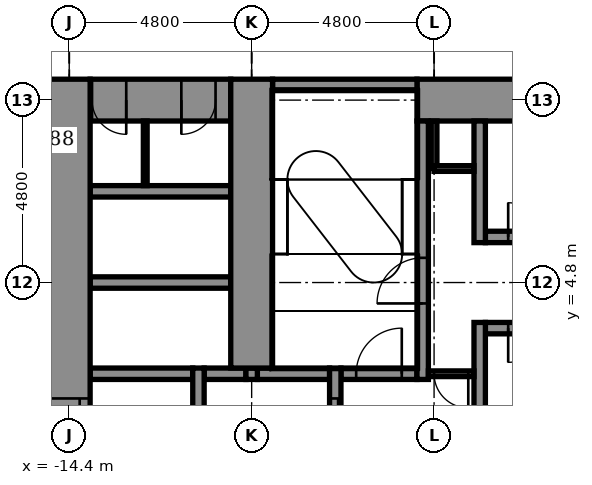
"""IFC4 building model, lengths in metres.
Left out: names, types, materials, properties, quantities, classifications, styles, units other than length and angle.
Written with IfcOpenShell. Run it as: python <this file> out.ifc"""

import sys

from ifc_helpers import new_model, si_unit, direction, frame, frame_2d, origin, place, context, subcontext, project, spatial, rectangle, extrude, element, fill, save


model = new_model("IFC4")
c1 = context("Model", 3, precision=1e-05, world=origin(), true_north=direction((0.0, 1.0)))
c2 = subcontext(c1, "Body", "Model", "MODEL_VIEW")
j1 = project(units=[si_unit("LENGTHUNIT", "METRE"), si_unit("PLANEANGLEUNIT", "RADIAN")], contexts=[c1])
p1 = place(None, origin())
s1 = spatial("IfcSite", under=j1, at=p1, CompositionType="ELEMENT")
p2 = place(p1, origin())
s2 = spatial("IfcBuilding", under=s1, at=p2, CompositionType="ELEMENT")
p3 = place(p2, frame((0.0, 0.0, 22.4)))
s3 = spatial("IfcBuildingStorey", under=s2, at=p3, CompositionType="ELEMENT", Elevation=22.4)
p4 = place(p3, frame((-13.85, 2.4, -0.25), z_axis=(0.0, 0.0, 1.0), x_axis=(1.0, 0.0, 0.0)))
e1 = element("IfcWall", 1, at=p4, inside=s3, PredefinedType="STANDARD", context=c2, shape_type="SweptSolid", body=[
    extrude(rectangle(XDim=2.7, YDim=0.3, at=frame_2d((1.35, 0.0))), origin(), (0.0, 0.0, 1.0), 5.5),
])
p5 = place(p3, frame((-10.85, 2.4, -0.25), z_axis=(0.0, 0.0, 1.0), x_axis=(1.0, 0.0, 0.0)))
e2 = element("IfcWall", 2, at=p5, inside=s3, PredefinedType="STANDARD", context=c2, shape_type="SweptSolid", body=[
    extrude(rectangle(XDim=1.1, YDim=0.3, at=frame_2d((0.55, 0.0))), origin(), (0.0, 0.0, 1.0), 5.5),
])
p6 = place(p3, frame((-9.45, 2.4, -0.25), z_axis=(0.0, 0.0, 1.0), x_axis=(1.0, 0.0, 0.0)))
e3 = element("IfcWall", 3, at=p6, inside=s3, PredefinedType="STANDARD", context=c2, shape_type="SweptSolid", body=[
    extrude(rectangle(XDim=1.9, YDim=0.3, at=frame_2d((0.95, 0.0))), origin(), (0.0, 0.0, 1.0), 5.5),
])
p7 = place(p3, frame((-7.25, 2.4, -0.25), z_axis=(0.0, 0.0, 1.0), x_axis=(1.0, 0.0, 0.0)))
e4 = element("IfcWall", 4, at=p7, inside=s3, PredefinedType="STANDARD", context=c2, shape_type="SweptSolid", body=[
    extrude(rectangle(XDim=2.0, YDim=0.3, at=frame_2d((1.0, 0.0))), origin(), (0.0, 0.0, 1.0), 5.5),
])
p8 = place(p7, frame((0.4, 0.0, 0.25)))
e5 = element("IfcOpeningElement", 5, at=p8, cuts=e4, PredefinedType="OPENING", context=c2, shape_type="SweptSolid", body=[
    extrude(rectangle(XDim=1.2, YDim=2.1, at=frame_2d((0.6, 1.05))), frame((0.0, 0.16, 0.0), z_axis=(0.0, -1.0, 0.0), x_axis=(1.0, 0.0, 0.0)), (0.0, 0.0, 1.0), 0.32),
])
p9 = place(p3, frame((-3.45, 3.6, -0.25), z_axis=(0.0, 0.0, 1.0), x_axis=(1.0, 0.0, 0.0)))
e6 = element("IfcWall", 6, at=p9, inside=s3, PredefinedType="STANDARD", context=c2, shape_type="SweptSolid", body=[
    extrude(rectangle(XDim=2.1, YDim=0.3, at=frame_2d((1.05, 0.0))), origin(), (0.0, 0.0, 1.0), 5.5),
])
p10 = place(p9, frame((0.6, 0.0, 0.25)))
e7 = element("IfcOpeningElement", 7, at=p10, cuts=e6, PredefinedType="OPENING", context=c2, shape_type="SweptSolid", body=[
    extrude(rectangle(XDim=0.9, YDim=2.1, at=frame_2d((0.45, 1.05))), frame((0.0, 0.16, 0.0), z_axis=(0.0, -1.0, 0.0), x_axis=(1.0, 0.0, 0.0)), (0.0, 0.0, 1.0), 0.32),
])
p11 = place(p3, frame((-13.85, 4.8, -0.25), z_axis=(0.0, 0.0, 1.0), x_axis=(1.0, 0.0, 0.0)))
e8 = element("IfcWall", 8, at=p11, inside=s3, PredefinedType="STANDARD", context=c2, shape_type="SweptSolid", body=[
    extrude(rectangle(XDim=3.7, YDim=0.3, at=frame_2d((1.85, 0.0))), origin(), (0.0, 0.0, 1.0), 5.5),
])
p12 = place(p3, frame((-3.45, 6.0, -0.25), z_axis=(0.0, 0.0, 1.0), x_axis=(1.0, 0.0, 0.0)))
e9 = element("IfcWall", 9, at=p12, inside=s3, PredefinedType="STANDARD", context=c2, shape_type="SweptSolid", body=[
    extrude(rectangle(XDim=2.1, YDim=0.3, at=frame_2d((1.05, 0.0))), origin(), (0.0, 0.0, 1.0), 5.5),
])
p13 = place(p12, frame((0.6, 0.0, 0.25)))
e10 = element("IfcOpeningElement", 10, at=p13, cuts=e9, PredefinedType="OPENING", context=c2, shape_type="SweptSolid", body=[
    extrude(rectangle(XDim=0.9, YDim=2.1, at=frame_2d((0.45, 1.05))), frame((0.0, 0.16, 0.0), z_axis=(0.0, -1.0, 0.0), x_axis=(1.0, 0.0, 0.0)), (0.0, 0.0, 1.0), 0.32),
])
p14 = place(p3, frame((-13.85, 7.2, -0.25), z_axis=(0.0, 0.0, 1.0), x_axis=(1.0, 0.0, 0.0)))
e11 = element("IfcWall", 11, at=p14, inside=s3, PredefinedType="STANDARD", context=c2, shape_type="SweptSolid", body=[
    extrude(rectangle(XDim=3.7, YDim=0.3, at=frame_2d((1.85, 0.0))), origin(), (0.0, 0.0, 1.0), 5.5),
])
p15 = place(p3, frame((-13.85, 9.6, -0.25), z_axis=(0.0, 0.0, 1.0), x_axis=(1.0, 0.0, 0.0)))
e12 = element("IfcWall", 12, at=p15, inside=s3, PredefinedType="SHEAR", context=c2, shape_type="SweptSolid", body=[
    extrude(rectangle(XDim=3.7, YDim=1.1, at=frame_2d((1.85, 0.0))), origin(), (0.0, 0.0, 1.0), 5.5),
])
p16 = place(p15, frame((0.05, 0.0, 0.25)))
e13 = element("IfcOpeningElement", 13, at=p16, cuts=e12, PredefinedType="OPENING", context=c2, shape_type="SweptSolid", body=[
    extrude(rectangle(XDim=0.9, YDim=2.1, at=frame_2d((0.45, 1.05))), frame((0.0, 0.56, 0.0), z_axis=(0.0, -1.0, 0.0), x_axis=(1.0, 0.0, 0.0)), (0.0, 0.0, 1.0), 1.12),
])
p17 = place(p15, frame((2.4, 0.0, 0.25)))
e14 = element("IfcOpeningElement", 14, at=p17, cuts=e12, PredefinedType="OPENING", context=c2, shape_type="SweptSolid", body=[
    extrude(rectangle(XDim=0.9, YDim=2.1, at=frame_2d((0.45, 1.05))), frame((0.0, 0.56, 0.0), z_axis=(0.0, -1.0, 0.0), x_axis=(1.0, 0.0, 0.0)), (0.0, 0.0, 1.0), 1.12),
])
p18 = place(p3, frame((-5.25, 9.6, -0.25), z_axis=(0.0, 0.0, 1.0), x_axis=(1.0, 0.0, 0.0)))
e15 = element("IfcWall", 15, at=p18, inside=s3, PredefinedType="SHEAR", context=c2, shape_type="SweptSolid", body=[
    extrude(rectangle(XDim=14.3, YDim=1.1, at=frame_2d((7.15, 0.0))), origin(), (0.0, 0.0, 1.0), 5.5),
])
p19 = place(p18, frame((9.35, 0.0, 0.25)))
e16 = element("IfcOpeningElement", 16, at=p19, cuts=e15, PredefinedType="OPENING", context=c2, shape_type="SweptSolid", body=[
    extrude(rectangle(XDim=1.4, YDim=2.1, at=frame_2d((0.7, 1.05))), frame((0.0, 0.56, 0.0), z_axis=(0.0, -1.0, 0.0), x_axis=(1.0, 0.0, 0.0)), (0.0, 0.0, 1.0), 1.12),
])
p20 = place(p3, frame((-9.05, 10.0, -0.25), z_axis=(0.0, 0.0, 1.0), x_axis=(1.0, 0.0, 0.0)))
e17 = element("IfcWall", 17, at=p20, inside=s3, PredefinedType="STANDARD", context=c2, shape_type="SweptSolid", body=[
    extrude(rectangle(XDim=3.8, YDim=0.3, at=frame_2d((1.9, 0.0))), origin(), (0.0, 0.0, 1.0), 5.5),
])
p21 = place(p3, frame((-14.4, -10.15, -0.25), z_axis=(0.0, 0.0, 1.0), x_axis=(0.0, 1.0, 0.0)))
e18 = element("IfcWall", 18, at=p21, inside=s3, PredefinedType="SHEAR", context=c2, shape_type="SweptSolid", body=[
    extrude(rectangle(XDim=20.3, YDim=1.1, at=frame_2d((10.15, 0.0))), origin(), (0.0, 0.0, 1.0), 5.5),
])
p22 = place(p21, frame((3.6, 0.0, 0.25)))
e19 = element("IfcOpeningElement", 19, at=p22, cuts=e18, PredefinedType="OPENING", context=c2, shape_type="SweptSolid", body=[
    extrude(rectangle(XDim=1.1, YDim=2.1, at=frame_2d((0.55, 1.05))), frame((0.0, 0.56, 0.0), z_axis=(0.0, -1.0, 0.0), x_axis=(1.0, 0.0, 0.0)), (0.0, 0.0, 1.0), 1.12),
])
p23 = place(p21, frame((6.0, 0.0, 0.25)))
e20 = element("IfcOpeningElement", 20, at=p23, cuts=e18, PredefinedType="OPENING", context=c2, shape_type="SweptSolid", body=[
    extrude(rectangle(XDim=1.1, YDim=2.1, at=frame_2d((0.55, 1.05))), frame((0.0, 0.56, 0.0), z_axis=(0.0, -1.0, 0.0), x_axis=(1.0, 0.0, 0.0)), (0.0, 0.0, 1.0), 1.12),
])
p24 = place(p21, frame((8.4, 0.0, 0.25)))
e21 = element("IfcOpeningElement", 21, at=p24, cuts=e18, PredefinedType="OPENING", context=c2, shape_type="SweptSolid", body=[
    extrude(rectangle(XDim=1.1, YDim=2.1, at=frame_2d((0.55, 1.05))), frame((0.0, 0.56, 0.0), z_axis=(0.0, -1.0, 0.0), x_axis=(1.0, 0.0, 0.0)), (0.0, 0.0, 1.0), 1.12),
])
p25 = place(p21, frame((10.8, 0.0, 0.25)))
e22 = element("IfcOpeningElement", 22, at=p25, cuts=e18, PredefinedType="OPENING", context=c2, shape_type="SweptSolid", body=[
    extrude(rectangle(XDim=1.1, YDim=2.1, at=frame_2d((0.55, 1.05))), frame((0.0, 0.56, 0.0), z_axis=(0.0, -1.0, 0.0), x_axis=(1.0, 0.0, 0.0)), (0.0, 0.0, 1.0), 1.12),
])
p26 = place(p3, frame((-11.0, -2.55, -0.25), z_axis=(0.0, 0.0, 1.0), x_axis=(0.0, 1.0, 0.0)))
e23 = element("IfcWall", 23, at=p26, inside=s3, PredefinedType="STANDARD", context=c2, shape_type="SweptSolid", body=[
    extrude(rectangle(XDim=5.1, YDim=0.3, at=frame_2d((2.55, 0.0))), origin(), (0.0, 0.0, 1.0), 5.5),
])
p27 = place(p3, frame((-9.6, 2.25, -0.25), z_axis=(0.0, 0.0, 1.0), x_axis=(0.0, 1.0, 0.0)))
e24 = element("IfcWall", 24, at=p27, inside=s3, PredefinedType="STANDARD", context=c2, shape_type="SweptSolid", body=[
    extrude(rectangle(XDim=0.3, YDim=0.3, at=frame_2d((0.15, 0.0))), origin(), (0.0, 0.0, 1.0), 5.5),
])
p28 = place(p3, frame((-9.6, 2.55, -0.25), z_axis=(0.0, 0.0, 1.0), x_axis=(0.0, 1.0, 0.0)))
e25 = element("IfcWall", 25, at=p28, inside=s3, PredefinedType="SHEAR", context=c2, shape_type="SweptSolid", body=[
    extrude(rectangle(XDim=7.6, YDim=1.1, at=frame_2d((3.8, 0.0))), origin(), (0.0, 0.0, 1.0), 5.5),
])
p29 = place(p3, frame((-7.4, -2.55, -0.25), z_axis=(0.0, 0.0, 1.0), x_axis=(0.0, 1.0, 0.0)))
e26 = element("IfcWall", 26, at=p29, inside=s3, PredefinedType="STANDARD", context=c2, shape_type="SweptSolid", body=[
    extrude(rectangle(XDim=5.1, YDim=0.3, at=frame_2d((2.55, 0.0))), origin(), (0.0, 0.0, 1.0), 5.5),
])
p30 = place(p29, frame((0.8, 0.0, 0.25)))
e27 = element("IfcOpeningElement", 27, at=p30, cuts=e26, PredefinedType="OPENING", context=c2, shape_type="SweptSolid", body=[
    extrude(rectangle(XDim=1.1, YDim=2.1, at=frame_2d((0.55, 1.05))), frame((0.0, 0.16, 0.0), z_axis=(0.0, -1.0, 0.0), x_axis=(1.0, 0.0, 0.0)), (0.0, 0.0, 1.0), 0.32),
])
p31 = place(p29, frame((3.2, 0.0, 0.25)))
e28 = element("IfcOpeningElement", 28, at=p31, cuts=e26, PredefinedType="OPENING", context=c2, shape_type="SweptSolid", body=[
    extrude(rectangle(XDim=1.1, YDim=2.1, at=frame_2d((0.55, 1.05))), frame((0.0, 0.16, 0.0), z_axis=(0.0, -1.0, 0.0), x_axis=(1.0, 0.0, 0.0)), (0.0, 0.0, 1.0), 0.32),
])
p32 = place(p3, frame((-5.1, 2.25, -0.25), z_axis=(0.0, 0.0, 1.0), x_axis=(0.0, 1.0, 0.0)))
e29 = element("IfcWall", 29, at=p32, inside=s3, PredefinedType="STANDARD", context=c2, shape_type="SweptSolid", body=[
    extrude(rectangle(XDim=6.8, YDim=0.3, at=frame_2d((3.4, 0.0))), origin(), (0.0, 0.0, 1.0), 5.5),
])
p33 = place(p32, frame((2.0, 0.0, 0.25)))
e30 = element("IfcOpeningElement", 30, at=p33, cuts=e29, PredefinedType="OPENING", context=c2, shape_type="SweptSolid", body=[
    extrude(rectangle(XDim=1.2, YDim=2.1, at=frame_2d((0.6, 1.05))), frame((0.0, 0.16, 0.0), z_axis=(0.0, -1.0, 0.0), x_axis=(1.0, 0.0, 0.0)), (0.0, 0.0, 1.0), 0.32),
])
p34 = place(p3, frame((-3.6, -3.75, -0.25), z_axis=(0.0, 0.0, 1.0), x_axis=(0.0, 1.0, 0.0)))
e31 = element("IfcWall", 31, at=p34, inside=s3, PredefinedType="STANDARD", context=c2, shape_type="SweptSolid", body=[
    extrude(rectangle(XDim=7.5, YDim=0.3, at=frame_2d((3.75, 0.0))), origin(), (0.0, 0.0, 1.0), 5.5),
])
p35 = place(p3, frame((-3.6, 5.85, -0.25), z_axis=(0.0, 0.0, 1.0), x_axis=(0.0, 1.0, 0.0)))
e32 = element("IfcWall", 32, at=p35, inside=s3, PredefinedType="STANDARD", context=c2, shape_type="SweptSolid", body=[
    extrude(rectangle(XDim=3.2, YDim=0.3, at=frame_2d((1.6, 0.0))), origin(), (0.0, 0.0, 1.0), 5.5),
])
p36 = place(p3, frame((-4.8, 7.8, 0.0), z_axis=(0.0, 0.0, 1.0), x_axis=(0.0, 1.0, 0.0)))
e33 = element("IfcWall", 33, at=p36, inside=s3, PredefinedType="PARTITIONING", context=c2, shape_type="SweptSolid", body=[
    extrude(rectangle(XDim=1.25, YDim=0.15, at=frame_2d((0.625, 0.0))), origin(), (0.0, 0.0, 1.0), 5.25),
])
p37 = place(p3, frame((-12.4, 7.35, 0.0), z_axis=(0.0, 0.0, 1.0), x_axis=(0.0, 1.0, 0.0)))
e34 = element("IfcWall", 34, at=p37, inside=s3, PredefinedType="PARTITIONING", context=c2, shape_type="SweptSolid", body=[
    extrude(rectangle(XDim=1.7, YDim=0.1, at=frame_2d((0.85, 0.0))), origin(), (0.0, 0.0, 1.0), 5.25),
])
p38 = place(p3, frame((-4.8, 7.8, 0.0), z_axis=(0.0, 0.0, 1.0), x_axis=(1.0, 0.0, 0.0)))
e35 = element("IfcWall", 35, at=p38, inside=s3, PredefinedType="PARTITIONING", context=c2, shape_type="SweptSolid", body=[
    extrude(rectangle(XDim=1.05, YDim=0.15, at=frame_2d((0.525, 0.0))), origin(), (0.0, 0.0, 1.0), 5.25),
])
p39 = place(p3, frame((-4.95, 2.4, 0.0), z_axis=(0.0, 0.0, 1.0), x_axis=(1.0, 0.0, 0.0)))
e36 = element("IfcWall", 36, at=p39, inside=s3, PredefinedType="PARTITIONING", context=c2, shape_type="SweptSolid", body=[
    extrude(rectangle(XDim=1.2, YDim=0.15, at=frame_2d((0.6, 0.0))), origin(), (0.0, 0.0, 1.0), 5.25),
])
p40 = place(p39, frame((0.15, 0.0, 0.0)))
e37 = element("IfcOpeningElement", 37, at=p40, cuts=e36, PredefinedType="OPENING", context=c2, shape_type="SweptSolid", body=[
    extrude(rectangle(XDim=0.9, YDim=2.1, at=frame_2d((0.45, 1.05))), frame((0.0, 0.085, 0.0), z_axis=(0.0, -1.0, 0.0), x_axis=(1.0, 0.0, 0.0)), (0.0, 0.0, 1.0), 0.17),
])
p41 = place(p31, origin())
e38 = element("IfcDoor", 38, at=p41, inside=s3, OperationType="DOUBLE_DOOR_SLIDING", PredefinedType="DOOR", context=c2, shape_type="SweptSolid", body=[
    extrude(rectangle(XDim=1.1, YDim=2.1, at=frame_2d((0.55, 1.05))), frame((0.0, 0.025, 0.0), z_axis=(0.0, -1.0, 0.0), x_axis=(1.0, 0.0, 0.0)), (0.0, 0.0, 1.0), 0.05),
])
fill(e28, e38)
p42 = place(p25, origin())
e39 = element("IfcDoor", 39, at=p42, inside=s3, OperationType="DOUBLE_DOOR_SLIDING", PredefinedType="DOOR", context=c2, shape_type="SweptSolid", body=[
    extrude(rectangle(XDim=1.1, YDim=2.1, at=frame_2d((0.55, 1.05))), frame((0.0, 0.025, 0.0), z_axis=(0.0, -1.0, 0.0), x_axis=(1.0, 0.0, 0.0)), (0.0, 0.0, 1.0), 0.05),
])
fill(e22, e39)
p43 = place(p33, origin())
e40 = element("IfcDoor", 40, at=p43, inside=s3, OperationType="SINGLE_SWING_LEFT", PredefinedType="DOOR", context=c2, shape_type="SweptSolid", body=[
    extrude(rectangle(XDim=1.2, YDim=2.1, at=frame_2d((0.6, 1.05))), frame((0.0, 0.025, 0.0), z_axis=(0.0, -1.0, 0.0), x_axis=(1.0, 0.0, 0.0)), (0.0, 0.0, 1.0), 0.05),
])
fill(e30, e40)
p44 = place(p13, origin())
e41 = element("IfcDoor", 41, at=p44, inside=s3, OperationType="SINGLE_SWING_LEFT", PredefinedType="DOOR", context=c2, shape_type="SweptSolid", body=[
    extrude(rectangle(XDim=0.9, YDim=2.1, at=frame_2d((0.45, 1.05))), frame((0.0, 0.025, 0.0), z_axis=(0.0, -1.0, 0.0), x_axis=(1.0, 0.0, 0.0)), (0.0, 0.0, 1.0), 0.05),
])
fill(e10, e41)
p45 = place(p10, frame((0.9, 0.0, 0.0), z_axis=(0.0, 0.0, 1.0), x_axis=(-1.0, 0.0, 0.0)))
e42 = element("IfcDoor", 42, at=p45, inside=s3, OperationType="SINGLE_SWING_LEFT", PredefinedType="DOOR", context=c2, shape_type="SweptSolid", body=[
    extrude(rectangle(XDim=0.9, YDim=2.1, at=frame_2d((0.45, 1.05))), frame((0.0, 0.025, 0.0), z_axis=(0.0, -1.0, 0.0), x_axis=(1.0, 0.0, 0.0)), (0.0, 0.0, 1.0), 0.05),
])
fill(e7, e42)
p46 = place(p16, frame((0.9, 0.0, 0.0), z_axis=(0.0, 0.0, 1.0), x_axis=(-1.0, 0.0, 0.0)))
e43 = element("IfcDoor", 43, at=p46, inside=s3, OperationType="SINGLE_SWING_RIGHT", PredefinedType="DOOR", context=c2, shape_type="SweptSolid", body=[
    extrude(rectangle(XDim=0.9, YDim=2.1, at=frame_2d((0.45, 1.05))), frame((0.0, 0.025, 0.0), z_axis=(0.0, -1.0, 0.0), x_axis=(1.0, 0.0, 0.0)), (0.0, 0.0, 1.0), 0.05),
])
fill(e13, e43)
p47 = place(p17, frame((0.9, 0.0, 0.0), z_axis=(0.0, 0.0, 1.0), x_axis=(-1.0, 0.0, 0.0)))
e44 = element("IfcDoor", 44, at=p47, inside=s3, OperationType="SINGLE_SWING_LEFT", PredefinedType="DOOR", context=c2, shape_type="SweptSolid", body=[
    extrude(rectangle(XDim=0.9, YDim=2.1, at=frame_2d((0.45, 1.05))), frame((0.0, 0.025, 0.0), z_axis=(0.0, -1.0, 0.0), x_axis=(1.0, 0.0, 0.0)), (0.0, 0.0, 1.0), 0.05),
])
fill(e14, e44)
p48 = place(p40, frame((0.9, 0.0, 0.0), z_axis=(0.0, 0.0, 1.0), x_axis=(-1.0, 0.0, 0.0)))
e45 = element("IfcDoor", 45, at=p48, inside=s3, OperationType="SINGLE_SWING_RIGHT", PredefinedType="DOOR", context=c2, shape_type="SweptSolid", body=[
    extrude(rectangle(XDim=0.9, YDim=2.1, at=frame_2d((0.45, 1.05))), frame((0.0, 0.025, 0.0), z_axis=(0.0, -1.0, 0.0), x_axis=(1.0, 0.0, 0.0)), (0.0, 0.0, 1.0), 0.05),
])
fill(e37, e45)
p49 = place(p8, origin())
e46 = element("IfcDoor", 46, at=p49, inside=s3, OperationType="SINGLE_SWING_RIGHT", PredefinedType="DOOR", context=c2, shape_type="SweptSolid", body=[
    extrude(rectangle(XDim=1.2, YDim=2.1, at=frame_2d((0.6, 1.05))), frame((0.0, 0.025, 0.0), z_axis=(0.0, -1.0, 0.0), x_axis=(1.0, 0.0, 0.0)), (0.0, 0.0, 1.0), 0.05),
])
fill(e5, e46)
save(model, sys.argv[1])
